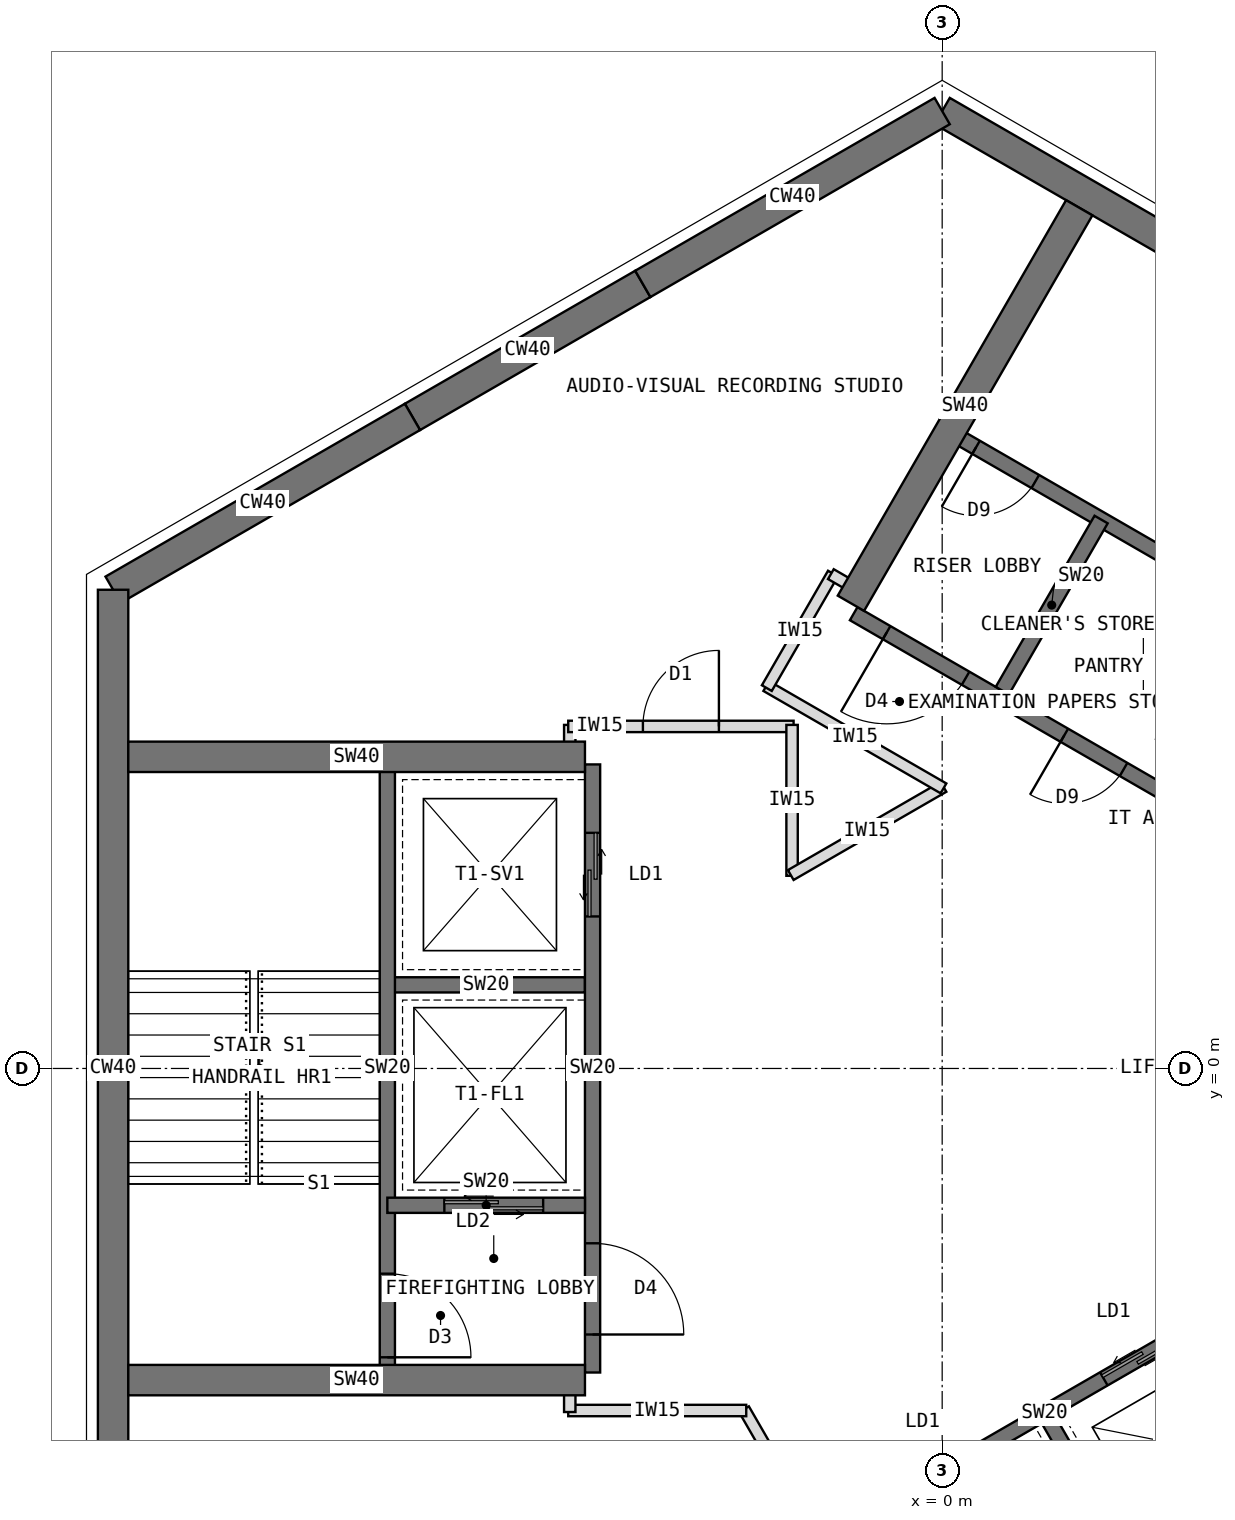
"""IFC4 building model, lengths in metres.
Left out: names, types, materials, properties, quantities, classifications, styles, units other than length and angle.
Written with IfcOpenShell. Run it as: python <this file> out.ifc"""

import sys

from ifc_helpers import new_model, si_unit, direction, frame, frame_2d, origin, place, context, subcontext, project, spatial, rectangle, extrude, element, fill, save


model = new_model("IFC4")
c1 = context("Model", 3, precision=1e-05, world=origin(), true_north=direction((0.0, 1.0)))
c2 = subcontext(c1, "Body", "Model", "MODEL_VIEW")
j1 = project(units=[si_unit("LENGTHUNIT", "METRE"), si_unit("PLANEANGLEUNIT", "RADIAN")], contexts=[c1])
p1 = place(None, origin())
s1 = spatial("IfcSite", under=j1, at=p1, CompositionType="ELEMENT")
p2 = place(p1, origin())
s2 = spatial("IfcBuilding", under=s1, at=p2, CompositionType="ELEMENT")
p3 = place(p2, frame((0.0, 0.0, 267.5)))
s3 = spatial("IfcBuildingStorey", under=s2, at=p3, CompositionType="ELEMENT", Elevation=267.5)
p4 = place(p3, frame((10.908, 6.298, 0.0), z_axis=(0.0, 0.0, 1.0), x_axis=(-0.866021940709, 0.500005998175, 0.0)))
e1 = element("IfcWall", 1, at=p4, inside=s3, PredefinedType="SHEAR", context=c2, shape_type="SweptSolid", body=[
    extrude(rectangle(XDim=12.596, YDim=0.4, at=frame_2d((6.298, 0.0))), origin(), (0.0, 0.0, 1.0), 4.0),
])
p5 = place(p3, frame((0.0, 12.596, 0.0), z_axis=(0.0, 0.0, 1.0), x_axis=(-0.866011268655, -0.500024481964, 0.0)))
e2 = element("IfcWall", 2, at=p5, inside=s3, PredefinedType="SHEAR", context=c2, shape_type="SweptSolid", body=[
    extrude(rectangle(XDim=4.548, YDim=0.4, at=frame_2d((2.274, 0.0))), origin(), (0.0, 0.0, 1.0), 4.0),
])
p6 = place(p3, frame((-3.939, 10.322, 0.0), z_axis=(0.0, 0.0, 1.0), x_axis=(-0.866019471182, -0.500010275428, 0.0)))
e3 = element("IfcWall", 3, at=p6, inside=s3, PredefinedType="SHEAR", context=c2, shape_type="SweptSolid", body=[
    extrude(rectangle(XDim=3.5, YDim=0.4, at=frame_2d((1.75, 0.0))), origin(), (0.0, 0.0, 1.0), 4.0),
])
p7 = place(p3, frame((-6.97, 8.572, 0.0), z_axis=(0.0, 0.0, 1.0), x_axis=(-0.866034513004, -0.499984222037, 0.0)))
e4 = element("IfcWall", 4, at=p7, inside=s3, PredefinedType="SHEAR", context=c2, shape_type="SweptSolid", body=[
    extrude(rectangle(XDim=4.548, YDim=0.4, at=frame_2d((2.274, 0.0))), origin(), (0.0, 0.0, 1.0), 4.0),
])
p8 = place(p3, frame((-10.908, 6.298, 0.0), z_axis=(0.0, 0.0, 1.0), x_axis=(0.0, -1.0, 0.0)))
e5 = element("IfcWall", 5, at=p8, inside=s3, PredefinedType="SHEAR", context=c2, shape_type="SweptSolid", body=[
    extrude(rectangle(XDim=12.596, YDim=0.4, at=frame_2d((6.298, 0.0))), origin(), (0.0, 0.0, 1.0), 4.0),
])
p9 = place(p3, frame((5.764, 1.984, 0.0), z_axis=(0.0, 0.0, 1.0), x_axis=(-0.866026010844, 0.49999894854, 0.0)))
e6 = element("IfcWall", 6, at=p9, inside=s3, PredefinedType="SHEAR", context=c2, shape_type="SweptSolid", body=[
    extrude(rectangle(XDim=8.0, YDim=0.2, at=frame_2d((4.0, 0.0))), origin(), (0.0, 0.0, 1.0), 4.0),
])
p10 = place(p9, frame((6.3, 0.0, 0.0)))
e7 = element("IfcOpeningElement", 7, at=p10, cuts=e6, PredefinedType="OPENING", context=c2, shape_type="SweptSolid", body=[
    extrude(rectangle(XDim=1.2, YDim=2.1, at=frame_2d((0.6, 1.05))), frame((0.0, 0.11, 0.0), z_axis=(0.0, -1.0, 0.0), x_axis=(1.0, 0.0, 0.0)), (0.0, 0.0, 1.0), 0.22),
])
p11 = place(p9, frame((1.0, 0.0, 0.0)))
e8 = element("IfcOpeningElement", 8, at=p11, cuts=e6, PredefinedType="OPENING", context=c2, shape_type="SweptSolid", body=[
    extrude(rectangle(XDim=0.9, YDim=2.1, at=frame_2d((0.45, 1.05))), frame((0.0, 0.11, 0.0), z_axis=(0.0, -1.0, 0.0), x_axis=(1.0, 0.0, 0.0)), (0.0, 0.0, 1.0), 0.22),
])
p12 = place(p9, frame((3.9, 0.0, 0.0)))
e9 = element("IfcOpeningElement", 9, at=p12, cuts=e6, PredefinedType="OPENING", context=c2, shape_type="SweptSolid", body=[
    extrude(rectangle(XDim=0.9, YDim=2.1, at=frame_2d((0.45, 1.05))), frame((0.0, 0.11, 0.0), z_axis=(0.0, -1.0, 0.0), x_axis=(1.0, 0.0, 0.0)), (0.0, 0.0, 1.0), 0.22),
])
p13 = place(p3, frame((0.791, 4.97, 0.0), z_axis=(0.0, 0.0, 1.0), x_axis=(0.499936506574, 0.866062058628, 0.0)))
e10 = element("IfcWall", 10, at=p13, inside=s3, PredefinedType="SHEAR", context=c2, shape_type="SweptSolid", body=[
    extrude(rectangle(XDim=2.6, YDim=0.2, at=frame_2d((1.3, 0.0))), origin(), (0.0, 0.0, 1.0), 4.0),
])
p14 = place(p3, frame((7.114, 4.322, 0.0), z_axis=(0.0, 0.0, 1.0), x_axis=(-0.866026010844, 0.49999894854, 0.0)))
e11 = element("IfcWall", 11, at=p14, inside=s3, PredefinedType="SHEAR", context=c2, shape_type="SweptSolid", body=[
    extrude(rectangle(XDim=8.0, YDim=0.2, at=frame_2d((4.0, 0.0))), origin(), (0.0, 0.0, 1.0), 4.0),
])
p15 = place(p14, frame((6.8, 0.0, 0.0)))
e12 = element("IfcOpeningElement", 12, at=p15, cuts=e11, PredefinedType="OPENING", context=c2, shape_type="SweptSolid", body=[
    extrude(rectangle(XDim=0.9, YDim=2.1, at=frame_2d((0.45, 1.05))), frame((0.0, 0.11, 0.0), z_axis=(0.0, -1.0, 0.0), x_axis=(1.0, 0.0, 0.0)), (0.0, 0.0, 1.0), 0.22),
])
p16 = place(p3, frame((-1.201, 6.12, 0.0), z_axis=(0.0, 0.0, 1.0), x_axis=(0.499997979876, 0.866026570101, 0.0)))
e13 = element("IfcWall", 13, at=p16, inside=s3, PredefinedType="SHEAR", context=c2, shape_type="SweptSolid", body=[
    extrude(rectangle(XDim=6.008, YDim=0.4, at=frame_2d((3.004, 0.0))), origin(), (0.0, 0.0, 1.0), 4.0),
])
p17 = place(p3, frame((-4.6, 4.0, 0.0), z_axis=(0.0, 0.0, 1.0), x_axis=(0.0, -1.0, 0.0)))
e14 = element("IfcWall", 14, at=p17, inside=s3, PredefinedType="SHEAR", context=c2, shape_type="SweptSolid", body=[
    extrude(rectangle(XDim=8.0, YDim=0.2, at=frame_2d((4.0, 0.0))), origin(), (0.0, 0.0, 1.0), 4.0),
])
p18 = place(p17, frame((6.3, 0.0, 0.0)))
e15 = element("IfcOpeningElement", 15, at=p18, cuts=e14, PredefinedType="OPENING", context=c2, shape_type="SweptSolid", body=[
    extrude(rectangle(XDim=1.2, YDim=2.1, at=frame_2d((0.6, 1.05))), frame((0.0, 0.11, 0.0), z_axis=(0.0, -1.0, 0.0), x_axis=(1.0, 0.0, 0.0)), (0.0, 0.0, 1.0), 0.22),
])
p19 = place(p17, frame((0.9, 0.0, 0.0)))
e16 = element("IfcOpeningElement", 16, at=p19, cuts=e14, PredefinedType="OPENING", context=c2, shape_type="SweptSolid", body=[
    extrude(rectangle(XDim=1.1, YDim=2.2, at=frame_2d((0.55, 1.1))), frame((0.0, 0.11, 0.0), z_axis=(0.0, -1.0, 0.0), x_axis=(1.0, 0.0, 0.0)), (0.0, 0.0, 1.0), 0.22),
])
p20 = place(p3, frame((-4.7, 1.1, 0.0), z_axis=(0.0, 0.0, 1.0), x_axis=(-1.0, 0.0, 0.0)))
e17 = element("IfcWall", 17, at=p20, inside=s3, PredefinedType="SHEAR", context=c2, shape_type="SweptSolid", body=[
    extrude(rectangle(XDim=2.6, YDim=0.2, at=frame_2d((1.3, 0.0))), origin(), (0.0, 0.0, 1.0), 4.0),
])
p21 = place(p3, frame((-4.7, -1.8, 0.0), z_axis=(0.0, 0.0, 1.0), x_axis=(-1.0, 0.0, 0.0)))
e18 = element("IfcWall", 18, at=p21, inside=s3, PredefinedType="SHEAR", context=c2, shape_type="SweptSolid", body=[
    extrude(rectangle(XDim=2.6, YDim=0.2, at=frame_2d((1.3, 0.0))), origin(), (0.0, 0.0, 1.0), 4.0),
])
p22 = place(p21, frame((0.55, 0.0, 0.0)))
e19 = element("IfcOpeningElement", 19, at=p22, cuts=e18, PredefinedType="OPENING", context=c2, shape_type="SweptSolid", body=[
    extrude(rectangle(XDim=1.3, YDim=2.2, at=frame_2d((0.65, 1.1))), frame((0.0, 0.11, 0.0), z_axis=(0.0, -1.0, 0.0), x_axis=(1.0, 0.0, 0.0)), (0.0, 0.0, 1.0), 0.22),
])
p23 = place(p3, frame((-7.3, 4.0, 0.0), z_axis=(0.0, 0.0, 1.0), x_axis=(0.0, -1.0, 0.0)))
e20 = element("IfcWall", 20, at=p23, inside=s3, PredefinedType="SHEAR", context=c2, shape_type="SweptSolid", body=[
    extrude(rectangle(XDim=8.0, YDim=0.2, at=frame_2d((4.0, 0.0))), origin(), (0.0, 0.0, 1.0), 4.0),
])
p24 = place(p23, frame((6.7, 0.0, 0.0)))
e21 = element("IfcOpeningElement", 21, at=p24, cuts=e20, PredefinedType="OPENING", context=c2, shape_type="SweptSolid", body=[
    extrude(rectangle(XDim=1.1, YDim=2.1, at=frame_2d((0.55, 1.05))), frame((0.0, 0.11, 0.0), z_axis=(0.0, -1.0, 0.0), x_axis=(1.0, 0.0, 0.0)), (0.0, 0.0, 1.0), 0.22),
])
for number, where, z_axis, x_axis in (
    (22, (-4.7, -4.1, 0.0), (0.0, 0.0, 1.0), (-1.0, 0.0, 0.0)),
    (23, (-4.7, 4.1, 0.0), (0.0, 0.0, 1.0), (-1.0, 0.0, 0.0)),
):
    element("IfcWall", number, at=place(p3, frame(where, z_axis=z_axis, x_axis=x_axis)), inside=s3, PredefinedType="SHEAR", context=c2, shape_type="SweptSolid", body=[
        extrude(rectangle(XDim=6.008, YDim=0.4, at=frame_2d((3.004, 0.0))), origin(), (0.0, 0.0, 1.0), 4.0),
    ])
p25 = place(p3, frame((-1.164, -5.984, 0.0), z_axis=(0.0, 0.0, 1.0), x_axis=(0.866026010844, 0.49999894854, 0.0)))
e24 = element("IfcWall", 24, at=p25, inside=s3, PredefinedType="SHEAR", context=c2, shape_type="SweptSolid", body=[
    extrude(rectangle(XDim=8.0, YDim=0.2, at=frame_2d((4.0, 0.0))), origin(), (0.0, 0.0, 1.0), 4.0),
])
p26 = place(p25, frame((6.3, 0.0, 0.0)))
e25 = element("IfcOpeningElement", 25, at=p26, cuts=e24, PredefinedType="OPENING", context=c2, shape_type="SweptSolid", body=[
    extrude(rectangle(XDim=1.2, YDim=2.1, at=frame_2d((0.6, 1.05))), frame((0.0, 0.11, 0.0), z_axis=(0.0, -1.0, 0.0), x_axis=(1.0, 0.0, 0.0)), (0.0, 0.0, 1.0), 0.22),
])
p27 = place(p25, frame((0.9, 0.0, 0.0)))
e26 = element("IfcOpeningElement", 26, at=p27, cuts=e24, PredefinedType="OPENING", context=c2, shape_type="SweptSolid", body=[
    extrude(rectangle(XDim=1.1, YDim=2.2, at=frame_2d((0.55, 1.1))), frame((0.0, 0.11, 0.0), z_axis=(0.0, -1.0, 0.0), x_axis=(1.0, 0.0, 0.0)), (0.0, 0.0, 1.0), 0.22),
])
p28 = place(p25, frame((3.8, 0.0, 0.0)))
e27 = element("IfcOpeningElement", 27, at=p28, cuts=e24, PredefinedType="OPENING", context=c2, shape_type="SweptSolid", body=[
    extrude(rectangle(XDim=1.1, YDim=2.2, at=frame_2d((0.55, 1.1))), frame((0.0, 0.11, 0.0), z_axis=(0.0, -1.0, 0.0), x_axis=(1.0, 0.0, 0.0)), (0.0, 0.0, 1.0), 0.22),
])
p29 = place(p3, frame((1.397, -4.62, 0.0), z_axis=(0.0, 0.0, 1.0), x_axis=(0.499936506574, -0.866062058628, 0.0)))
e28 = element("IfcWall", 28, at=p29, inside=s3, PredefinedType="SHEAR", context=c2, shape_type="SweptSolid", body=[
    extrude(rectangle(XDim=2.6, YDim=0.2, at=frame_2d((1.3, 0.0))), origin(), (0.0, 0.0, 1.0), 4.0),
])
p30 = place(p3, frame((0.186, -8.322, 0.0), z_axis=(0.0, 0.0, 1.0), x_axis=(0.866026010844, 0.49999894854, 0.0)))
e29 = element("IfcWall", 29, at=p30, inside=s3, PredefinedType="SHEAR", context=c2, shape_type="SweptSolid", body=[
    extrude(rectangle(XDim=8.0, YDim=0.2, at=frame_2d((4.0, 0.0))), origin(), (0.0, 0.0, 1.0), 4.0),
])
p31 = place(p30, frame((6.7, 0.0, 0.0)))
e30 = element("IfcOpeningElement", 30, at=p31, cuts=e29, PredefinedType="OPENING", context=c2, shape_type="SweptSolid", body=[
    extrude(rectangle(XDim=1.1, YDim=2.1, at=frame_2d((0.55, 1.05))), frame((0.0, 0.11, 0.0), z_axis=(0.0, -1.0, 0.0), x_axis=(1.0, 0.0, 0.0)), (0.0, 0.0, 1.0), 0.22),
])
p32 = place(p3, frame((-1.437, -6.511, 0.0), z_axis=(0.0, 0.0, 1.0), x_axis=(-0.500074377092, 0.865982457891, 0.0)))
e31 = element("IfcWall", 31, at=p32, inside=s3, PredefinedType="PARTITIONING", context=c2, shape_type="SweptSolid", body=[
    extrude(rectangle(XDim=2.342, YDim=0.15, at=frame_2d((1.171, 0.0))), origin(), (0.0, 0.0, 1.0), 3.8),
])
p33 = place(p32, frame((0.671, 0.0, 0.0)))
e32 = element("IfcOpeningElement", 32, at=p33, cuts=e31, PredefinedType="OPENING", context=c2, shape_type="SweptSolid", body=[
    extrude(rectangle(XDim=1.0, YDim=2.1, at=frame_2d((0.5, 1.05))), frame((0.0, 0.085, 0.0), z_axis=(0.0, -1.0, 0.0), x_axis=(1.0, 0.0, 0.0)), (0.0, 0.0, 1.0), 0.17),
])
p34 = place(p3, frame((-2.578, -4.5, 0.0), z_axis=(0.0, 0.0, 1.0), x_axis=(-1.0, 0.0, 0.0)))
e33 = element("IfcWall", 33, at=p34, inside=s3, PredefinedType="PARTITIONING", context=c2, shape_type="SweptSolid", body=[
    extrude(rectangle(XDim=2.342, YDim=0.15, at=frame_2d((1.171, 0.0))), origin(), (0.0, 0.0, 1.0), 3.8),
])
for number, where, z_axis, x_axis in (
    (34, (-4.9, -4.52, 0.0), (0.0, 0.0, 1.0), (0.0, 1.0, 0.0)),
    (35, (-4.9, 4.09, 0.0), (0.0, 0.0, 1.0), (0.0, 1.0, 0.0)),
):
    element("IfcWall", number, at=place(p3, frame(where, z_axis=z_axis, x_axis=x_axis)), inside=s3, PredefinedType="PARTITIONING", context=c2, shape_type="SweptSolid", body=[
        extrude(rectangle(XDim=0.43, YDim=0.15, at=frame_2d((0.215, 0.0))), origin(), (0.0, 0.0, 1.0), 3.8),
    ])
p35 = place(p3, frame((-4.92, 4.5, 0.0), z_axis=(0.0, 0.0, 1.0), x_axis=(1.0, 0.0, 0.0)))
e36 = element("IfcWall", 36, at=p35, inside=s3, PredefinedType="PARTITIONING", context=c2, shape_type="SweptSolid", body=[
    extrude(rectangle(XDim=2.965, YDim=0.15, at=frame_2d((1.482, 0.0))), origin(), (0.0, 0.0, 1.0), 3.8),
])
p36 = place(p35, frame((0.982, 0.0, 0.0)))
e37 = element("IfcOpeningElement", 37, at=p36, cuts=e36, PredefinedType="OPENING", context=c2, shape_type="SweptSolid", body=[
    extrude(rectangle(XDim=1.0, YDim=2.1, at=frame_2d((0.5, 1.05))), frame((0.0, 0.085, 0.0), z_axis=(0.0, -1.0, 0.0), x_axis=(1.0, 0.0, 0.0)), (0.0, 0.0, 1.0), 0.17),
])
p37 = place(p3, frame((-1.975, 4.52, 0.0), z_axis=(0.0, 0.0, 1.0), x_axis=(0.0, -1.0, 0.0)))
e38 = element("IfcWall", 38, at=p37, inside=s3, PredefinedType="PARTITIONING", context=c2, shape_type="SweptSolid", body=[
    extrude(rectangle(XDim=1.985, YDim=0.15, at=frame_2d((0.993, 0.0))), origin(), (0.0, 0.0, 1.0), 3.8),
])
p38 = place(p3, frame((-1.992, 2.545, 0.0), z_axis=(0.0, 0.0, 1.0), x_axis=(0.866059450854, 0.499941024108, 0.0)))
e39 = element("IfcWall", 39, at=p38, inside=s3, PredefinedType="PARTITIONING", context=c2, shape_type="SweptSolid", body=[
    extrude(rectangle(XDim=2.321, YDim=0.15, at=frame_2d((1.16, 0.0))), origin(), (0.0, 0.0, 1.0), 3.8),
])
p39 = place(p3, frame((0.017, 3.685, 0.0), z_axis=(0.0, 0.0, 1.0), x_axis=(-0.866036099759, 0.499981473571, 0.0)))
e40 = element("IfcWall", 40, at=p39, inside=s3, PredefinedType="PARTITIONING", context=c2, shape_type="SweptSolid", body=[
    extrude(rectangle(XDim=2.692, YDim=0.15, at=frame_2d((1.346, 0.0))), origin(), (0.0, 0.0, 1.0), 3.8),
])
p40 = place(p3, frame((-2.307, 5.004, 0.0), z_axis=(0.0, 0.0, 1.0), x_axis=(0.500062521093, 0.865989304205, 0.0)))
e41 = element("IfcWall", 41, at=p40, inside=s3, PredefinedType="PARTITIONING", context=c2, shape_type="SweptSolid", body=[
    extrude(rectangle(XDim=1.74, YDim=0.15, at=frame_2d((0.87, 0.0))), origin(), (0.0, 0.0, 1.0), 3.8),
])
p41 = place(p3, frame((-1.464, 6.503, 0.0), z_axis=(0.0, 0.0, 1.0), x_axis=(0.866138304741, -0.499804398801, 0.0)))
e42 = element("IfcWall", 42, at=p41, inside=s3, PredefinedType="PARTITIONING", context=c2, shape_type="SweptSolid", body=[
    extrude(rectangle(XDim=0.43, YDim=0.15, at=frame_2d((0.215, 0.0))), origin(), (0.0, 0.0, 1.0), 3.8),
])
p42 = place(p10, origin())
e43 = element("IfcDoor", 43, at=p42, inside=s3, OperationType="SINGLE_SWING_RIGHT", PredefinedType="DOOR", context=c2, shape_type="SweptSolid", body=[
    extrude(rectangle(XDim=1.2, YDim=2.1, at=frame_2d((0.6, 1.05))), frame((0.0, 0.025, 0.0), z_axis=(0.0, -1.0, 0.0), x_axis=(1.0, 0.0, 0.0)), (0.0, 0.0, 1.0), 0.05),
])
fill(e7, e43)
p43 = place(p15, origin())
e44 = element("IfcDoor", 44, at=p43, inside=s3, OperationType="SINGLE_SWING_RIGHT", PredefinedType="DOOR", context=c2, shape_type="SweptSolid", body=[
    extrude(rectangle(XDim=0.9, YDim=2.1, at=frame_2d((0.45, 1.05))), frame((0.0, 0.025, 0.0), z_axis=(0.0, -1.0, 0.0), x_axis=(1.0, 0.0, 0.0)), (0.0, 0.0, 1.0), 0.05),
])
fill(e12, e44)
p44 = place(p18, origin())
e45 = element("IfcDoor", 45, at=p44, inside=s3, OperationType="SINGLE_SWING_RIGHT", PredefinedType="DOOR", context=c2, shape_type="SweptSolid", body=[
    extrude(rectangle(XDim=1.2, YDim=2.1, at=frame_2d((0.6, 1.05))), frame((0.0, 0.025, 0.0), z_axis=(0.0, -1.0, 0.0), x_axis=(1.0, 0.0, 0.0)), (0.0, 0.0, 1.0), 0.05),
])
fill(e15, e45)
p45 = place(p22, origin())
e46 = element("IfcDoor", 46, at=p45, inside=s3, OperationType="DOUBLE_DOOR_SLIDING", PredefinedType="DOOR", context=c2, shape_type="SweptSolid", body=[
    extrude(rectangle(XDim=1.3, YDim=2.2, at=frame_2d((0.65, 1.1))), frame((0.0, 0.025, 0.0), z_axis=(0.0, -1.0, 0.0), x_axis=(1.0, 0.0, 0.0)), (0.0, 0.0, 1.0), 0.05),
])
fill(e19, e46)
p46 = place(p19, origin())
e47 = element("IfcDoor", 47, at=p46, inside=s3, OperationType="DOUBLE_DOOR_SLIDING", PredefinedType="DOOR", context=c2, shape_type="SweptSolid", body=[
    extrude(rectangle(XDim=1.1, YDim=2.2, at=frame_2d((0.55, 1.1))), frame((0.0, 0.025, 0.0), z_axis=(0.0, -1.0, 0.0), x_axis=(1.0, 0.0, 0.0)), (0.0, 0.0, 1.0), 0.05),
])
fill(e16, e47)
p47 = place(p24, origin())
e48 = element("IfcDoor", 48, at=p47, inside=s3, OperationType="SINGLE_SWING_RIGHT", PredefinedType="DOOR", context=c2, shape_type="SweptSolid", body=[
    extrude(rectangle(XDim=1.1, YDim=2.1, at=frame_2d((0.55, 1.05))), frame((0.0, 0.025, 0.0), z_axis=(0.0, -1.0, 0.0), x_axis=(1.0, 0.0, 0.0)), (0.0, 0.0, 1.0), 0.05),
])
fill(e21, e48)
p48 = place(p28, origin())
e49 = element("IfcDoor", 49, at=p48, inside=s3, OperationType="DOUBLE_DOOR_SLIDING", PredefinedType="DOOR", context=c2, shape_type="SweptSolid", body=[
    extrude(rectangle(XDim=1.1, YDim=2.2, at=frame_2d((0.55, 1.1))), frame((0.0, 0.025, 0.0), z_axis=(0.0, -1.0, 0.0), x_axis=(1.0, 0.0, 0.0)), (0.0, 0.0, 1.0), 0.05),
])
fill(e27, e49)
p49 = place(p36, origin())
e50 = element("IfcDoor", 50, at=p49, inside=s3, OperationType="SINGLE_SWING_RIGHT", PredefinedType="DOOR", context=c2, shape_type="SweptSolid", body=[
    extrude(rectangle(XDim=1.0, YDim=2.1, at=frame_2d((0.5, 1.05))), frame((0.0, 0.025, 0.0), z_axis=(0.0, -1.0, 0.0), x_axis=(1.0, 0.0, 0.0)), (0.0, 0.0, 1.0), 0.05),
])
fill(e37, e50)
p50 = place(p12, origin())
e51 = element("IfcDoor", 51, at=p50, inside=s3, OperationType="SINGLE_SWING_RIGHT", PredefinedType="DOOR", context=c2, shape_type="SweptSolid", body=[
    extrude(rectangle(XDim=0.9, YDim=2.1, at=frame_2d((0.45, 1.05))), frame((0.0, 0.025, 0.0), z_axis=(0.0, -1.0, 0.0), x_axis=(1.0, 0.0, 0.0)), (0.0, 0.0, 1.0), 0.05),
])
fill(e9, e51)
save(model, sys.argv[1])
